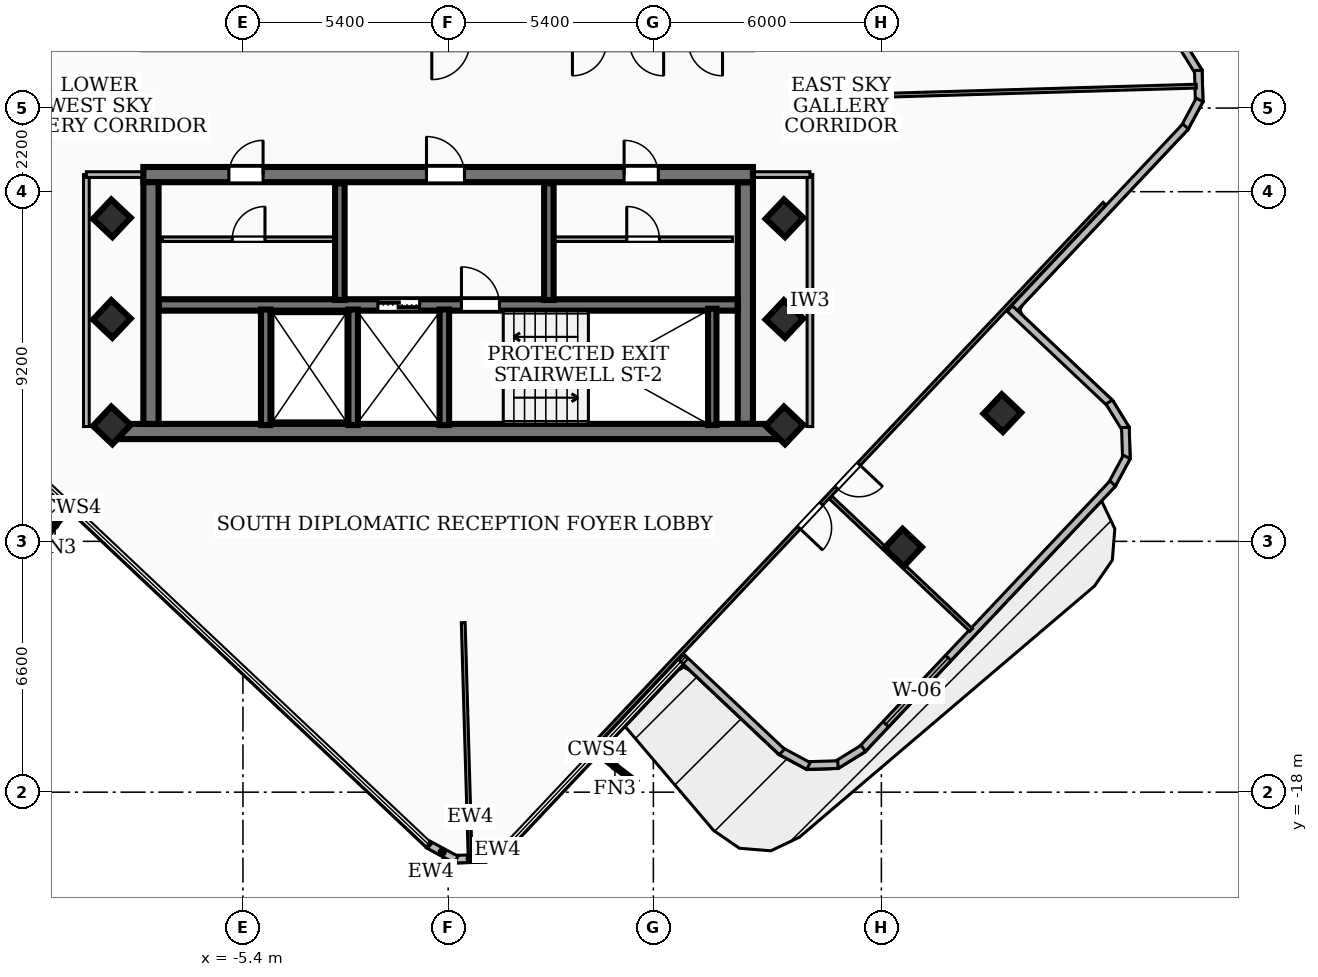
"""IFC4 building model, lengths in metres.
Left out: names, types, materials, properties, quantities, classifications, styles, units other than length and angle.
Written with IfcOpenShell. Run it as: python <this file> out.ifc"""

import sys

from ifc_helpers import new_model, si_unit, direction, frame, frame_2d, origin, origin_2d, place, context, subcontext, project, spatial, rectangle, extrude, element, fill, save


model = new_model("IFC4")
c1 = context("Model", 3, precision=1e-05, world=origin(), true_north=direction((0.0, 1.0)))
c2 = subcontext(c1, "Body", "Model", "MODEL_VIEW")
j1 = project(units=[si_unit("LENGTHUNIT", "METRE"), si_unit("PLANEANGLEUNIT", "RADIAN")], contexts=[c1])
p1 = place(None, origin())
s1 = spatial("IfcSite", under=j1, at=p1, CompositionType="ELEMENT")
p2 = place(p1, origin())
s2 = spatial("IfcBuilding", under=s1, at=p2, CompositionType="ELEMENT")
p3 = place(p2, frame((0.0, 0.0, 244.08)))
s3 = spatial("IfcBuildingStorey", under=s2, at=p3, CompositionType="ELEMENT", Elevation=244.08)
p4 = place(p3, frame((8.78, -8.51, 0.0), z_axis=(0.0, 0.0, 1.0), x_axis=(-1.0, 0.0, 0.0)))
e1 = element("IfcWall", 1, at=p4, inside=s3, PredefinedType="SHEAR", context=c2, shape_type="SweptSolid", body=[
    extrude(rectangle(XDim=17.56, YDim=0.4, at=frame_2d((8.78, 0.0))), origin(), (0.0, 0.0, 1.0), 3.16),
])
p5 = place(p3, frame((-8.02, -1.75, 0.0), z_axis=(0.0, 0.0, 1.0), x_axis=(1.0, 0.0, 0.0)))
e2 = element("IfcWall", 2, at=p5, inside=s3, PredefinedType="SHEAR", context=c2, shape_type="SweptSolid", body=[
    extrude(rectangle(XDim=16.04, YDim=0.4, at=frame_2d((8.02, 0.0))), origin(), (0.0, 0.0, 1.0), 3.16),
])
p6 = place(p5, frame((7.45, 0.0, 0.0)))
e3 = element("IfcOpeningElement", 3, at=p6, cuts=e2, PredefinedType="OPENING", context=c2, shape_type="SweptSolid", body=[
    extrude(rectangle(XDim=1.0, YDim=2.1, at=frame_2d((0.5, 1.05))), frame((0.0, 0.21, 0.0), z_axis=(0.0, -1.0, 0.0), x_axis=(1.0, 0.0, 0.0)), (0.0, 0.0, 1.0), 0.42),
])
p7 = place(p5, frame((12.65, 0.0, 0.0)))
e4 = element("IfcOpeningElement", 4, at=p7, cuts=e2, PredefinedType="OPENING", context=c2, shape_type="SweptSolid", body=[
    extrude(rectangle(XDim=0.9, YDim=2.06, at=frame_2d((0.45, 1.03))), frame((0.0, 0.21, 0.0), z_axis=(0.0, -1.0, 0.0), x_axis=(1.0, 0.0, 0.0)), (0.0, 0.0, 1.0), 0.42),
])
p8 = place(p5, frame((2.25, 0.0, 0.0)))
e5 = element("IfcOpeningElement", 5, at=p8, cuts=e2, PredefinedType="OPENING", context=c2, shape_type="SweptSolid", body=[
    extrude(rectangle(XDim=0.9, YDim=2.06, at=frame_2d((0.45, 1.03))), frame((0.0, 0.21, 0.0), z_axis=(0.0, -1.0, 0.0), x_axis=(1.0, 0.0, 0.0)), (0.0, 0.0, 1.0), 0.42),
])
for number, where, z_axis, x_axis in (
    (6, (-7.82, -8.31, 0.0), (0.0, 0.0, 1.0), (0.0, 1.0, 0.0)),
    (7, (7.82, -1.95, 0.0), (0.0, 0.0, 1.0), (0.0, -1.0, 0.0)),
):
    element("IfcWall", number, at=place(p3, frame(where, z_axis=z_axis, x_axis=x_axis)), inside=s3, PredefinedType="SHEAR", context=c2, shape_type="SweptSolid", body=[
        extrude(rectangle(XDim=6.36, YDim=0.4, at=frame_2d((3.18, 0.0))), origin(), (0.0, 0.0, 1.0), 3.16),
    ])
p9 = place(p3, frame((-7.62, -5.18, 0.0), z_axis=(0.0, 0.0, 1.0), x_axis=(1.0, 0.0, 0.0)))
e8 = element("IfcWall", 8, at=p9, inside=s3, PredefinedType="SOLIDWALL", context=c2, shape_type="SweptSolid", body=[
    extrude(rectangle(XDim=15.24, YDim=0.3, at=frame_2d((7.62, 0.0))), origin(), (0.0, 0.0, 1.0), 3.16),
])
p10 = place(p9, frame((5.77, 0.0, 0.0)))
e9 = element("IfcOpeningElement", 9, at=p10, cuts=e8, PredefinedType="OPENING", context=c2, shape_type="SweptSolid", body=[
    extrude(rectangle(XDim=1.1, YDim=2.15, at=frame_2d((0.55, 1.075))), frame((0.0, 0.16, 0.0), z_axis=(0.0, -1.0, 0.0), x_axis=(1.0, 0.0, 0.0)), (0.0, 0.0, 1.0), 0.32),
])
p11 = place(p9, frame((7.97, 0.0, 0.0)))
e10 = element("IfcOpeningElement", 10, at=p11, cuts=e8, PredefinedType="OPENING", context=c2, shape_type="SweptSolid", body=[
    extrude(rectangle(XDim=1.0, YDim=2.1, at=frame_2d((0.5, 1.05))), frame((0.0, 0.16, 0.0), z_axis=(0.0, -1.0, 0.0), x_axis=(1.0, 0.0, 0.0)), (0.0, 0.0, 1.0), 0.32),
])
p12 = place(p3, frame((6.95, -8.34, 0.0), z_axis=(0.0, 0.0, 1.0), x_axis=(0.0, 1.0, 0.0)))
e11 = element("IfcWall", 11, at=p12, inside=s3, PredefinedType="SOLIDWALL", context=c2, shape_type="SweptSolid", body=[
    extrude(rectangle(XDim=3.06, YDim=0.22, at=frame_2d((1.53, 0.0))), origin(), (0.0, 0.0, 1.0), 3.16),
])
for number, where, z_axis, x_axis in (
    (12, (-0.1, -8.34, 0.0), (0.0, 0.0, 1.0), (0.0, 1.0, 0.0)),
    (13, (-2.5, -8.34, 0.0), (0.0, 0.0, 1.0), (0.0, 1.0, 0.0)),
    (14, (-4.8, -8.34, 0.0), (0.0, 0.0, 1.0), (0.0, 1.0, 0.0)),
):
    element("IfcWall", number, at=place(p3, frame(where, z_axis=z_axis, x_axis=x_axis)), inside=s3, PredefinedType="SOLIDWALL", context=c2, shape_type="SweptSolid", body=[
        extrude(rectangle(XDim=3.04, YDim=0.25, at=frame_2d((1.52, 0.0))), origin(), (0.0, 0.0, 1.0), 3.16),
    ])
for number, where, z_axis, x_axis in (
    (15, (-2.85, -5.05, 0.0), (0.0, 0.0, 1.0), (0.0, 1.0, 0.0)),
    (16, (2.65, -5.05, 0.0), (0.0, 0.0, 1.0), (0.0, 1.0, 0.0)),
):
    element("IfcWall", number, at=place(p3, frame(where, z_axis=z_axis, x_axis=x_axis)), inside=s3, PredefinedType="SOLIDWALL", context=c2, shape_type="SweptSolid", body=[
        extrude(rectangle(XDim=3.07, YDim=0.25, at=frame_2d((1.535, 0.0))), origin(), (0.0, 0.0, 1.0), 3.16),
    ])
for number, where, z_axis, x_axis in (
    (17, (-8.85, -5.55, 0.0), (0.0, 0.0, 1.0), (0.686, 0.728, 0.0)),
    (18, (-8.85, -2.9, 0.0), (0.0, 0.0, 1.0), (0.686, 0.728, 0.0)),
    (19, (8.85, -5.55, 0.0), (0.0, 0.0, 1.0), (0.686, 0.728, 0.0)),
    (20, (8.85, -2.9, 0.0), (0.0, 0.0, 1.0), (0.686, 0.728, 0.0)),
    (21, (8.85, -8.35, 0.0), (0.0, 0.0, 1.0), (0.686, 0.728, 0.0)),
    (22, (-8.85, -8.35, 0.0), (0.0, 0.0, 1.0), (0.686, 0.728, 0.0)),
    (23, (11.971, -11.566, 0.0), (0.0, 0.0, 1.0), (0.686, 0.728, 0.0)),
    (24, (14.583, -8.026, 0.0), (0.0, 0.0, 1.0), (0.686, 0.728, 0.0)),
):
    element("IfcColumn", number, at=place(p3, frame(where, z_axis=z_axis, x_axis=x_axis)), inside=s3, PredefinedType="COLUMN", context=c2, shape_type="SweptSolid", body=[
        extrude(rectangle(XDim=0.7, YDim=0.7, at=origin_2d()), origin(), (0.0, 0.0, 1.0), 3.42),
    ])
p13 = place(p3, frame((1.658, -19.313, 0.0), z_axis=(0.0, 0.0, 1.0), x_axis=(-0.850997215859, -0.52517019965, 0.0)))
e25 = element("IfcWall", 25, at=p13, inside=s3, PredefinedType="SOLIDWALL", context=c2, shape_type="SweptSolid", body=[
    extrude(rectangle(XDim=0.838, YDim=0.2, at=frame_2d((0.419, 0.0))), origin(), (0.0, 0.0, 1.0), 3.16),
])
p14 = place(p3, frame((0.991, -19.739, 0.0), z_axis=(0.0, 0.0, 1.0), x_axis=(-0.999578691641, -0.029024803491, 0.0)))
e26 = element("IfcWall", 26, at=p14, inside=s3, PredefinedType="SOLIDWALL", context=c2, shape_type="SweptSolid", body=[
    extrude(rectangle(XDim=0.824, YDim=0.2, at=frame_2d((0.412, 0.0))), origin(), (0.0, 0.0, 1.0), 3.16),
])
p15 = place(p3, frame((0.214, -19.774, 0.0), z_axis=(0.0, 0.0, 1.0), x_axis=(-0.880199822755, 0.474603278561, 0.0)))
e27 = element("IfcWall", 27, at=p15, inside=s3, PredefinedType="SOLIDWALL", context=c2, shape_type="SweptSolid", body=[
    extrude(rectangle(XDim=0.838, YDim=0.2, at=frame_2d((0.419, 0.0))), origin(), (0.0, 0.0, 1.0), 3.16),
])
p16 = place(p3, frame((19.313, 1.658, 0.0), z_axis=(0.0, 0.0, 1.0), x_axis=(0.52517019965, -0.850997215859, 0.0)))
e28 = element("IfcWall", 28, at=p16, inside=s3, PredefinedType="SOLIDWALL", context=c2, shape_type="SweptSolid", body=[
    extrude(rectangle(XDim=0.838, YDim=0.2, at=frame_2d((0.419, 0.0))), origin(), (0.0, 0.0, 1.0), 3.16),
])
p17 = place(p3, frame((19.739, 0.991, 0.0), z_axis=(0.0, 0.0, 1.0), x_axis=(0.029024803491, -0.999578691641, 0.0)))
e29 = element("IfcWall", 29, at=p17, inside=s3, PredefinedType="SOLIDWALL", context=c2, shape_type="SweptSolid", body=[
    extrude(rectangle(XDim=0.824, YDim=0.2, at=frame_2d((0.412, 0.0))), origin(), (0.0, 0.0, 1.0), 3.16),
])
p18 = place(p3, frame((19.774, 0.214, 0.0), z_axis=(0.0, 0.0, 1.0), x_axis=(-0.474603278561, -0.880199822755, 0.0)))
e30 = element("IfcWall", 30, at=p18, inside=s3, PredefinedType="SOLIDWALL", context=c2, shape_type="SweptSolid", body=[
    extrude(rectangle(XDim=0.838, YDim=0.2, at=frame_2d((0.419, 0.0))), origin(), (0.0, 0.0, 1.0), 3.16),
])
p19 = place(p3, frame((19.405, -0.484, 0.0), z_axis=(0.0, 0.0, 1.0), x_axis=(-0.686028756372, -0.727574426042, 0.0)))
e31 = element("IfcWall", 31, at=p19, inside=s3, PredefinedType="SOLIDWALL", context=c2, shape_type="SweptSolid", body=[
    extrude(rectangle(XDim=6.74, YDim=0.2, at=frame_2d((3.37, 0.0))), origin(), (0.0, 0.0, 1.0), 3.16),
])
p20 = place(p3, frame((14.778, -5.275, 0.0), z_axis=(0.0, 0.0, 1.0), x_axis=(0.727262285553, -0.686359649172, 0.0)))
e32 = element("IfcWall", 32, at=p20, inside=s3, PredefinedType="SOLIDWALL", context=c2, shape_type="SweptSolid", body=[
    extrude(rectangle(XDim=3.641, YDim=0.2, at=frame_2d((1.82, 0.0))), origin(), (0.0, 0.0, 1.0), 3.16),
])
p21 = place(p3, frame((17.395, -7.736, 0.0), z_axis=(0.0, 0.0, 1.0), x_axis=(0.52517019965, -0.850997215859, 0.0)))
e33 = element("IfcWall", 33, at=p21, inside=s3, PredefinedType="SOLIDWALL", context=c2, shape_type="SweptSolid", body=[
    extrude(rectangle(XDim=0.838, YDim=0.2, at=frame_2d((0.419, 0.0))), origin(), (0.0, 0.0, 1.0), 3.16),
])
p22 = place(p3, frame((17.821, -8.403, 0.0), z_axis=(0.0, 0.0, 1.0), x_axis=(0.030208429442, -0.999543621255, 0.0)))
e34 = element("IfcWall", 34, at=p22, inside=s3, PredefinedType="SOLIDWALL", context=c2, shape_type="SweptSolid", body=[
    extrude(rectangle(XDim=0.824, YDim=0.2, at=frame_2d((0.412, 0.0))), origin(), (0.0, 0.0, 1.0), 3.16),
])
p23 = place(p3, frame((17.857, -9.18, 0.0), z_axis=(0.0, 0.0, 1.0), x_axis=(-0.474603278561, -0.880199822755, 0.0)))
e35 = element("IfcWall", 35, at=p23, inside=s3, PredefinedType="SOLIDWALL", context=c2, shape_type="SweptSolid", body=[
    extrude(rectangle(XDim=0.838, YDim=0.2, at=frame_2d((0.419, 0.0))), origin(), (0.0, 0.0, 1.0), 3.16),
])
p24 = place(p3, frame((17.488, -9.878, 0.0), z_axis=(0.0, 0.0, 1.0), x_axis=(-0.686075032126, -0.727530789928, 0.0)))
e36 = element("IfcWall", 36, at=p24, inside=s3, PredefinedType="SOLIDWALL", context=c2, shape_type="SweptSolid", body=[
    extrude(rectangle(XDim=9.623, YDim=0.2, at=frame_2d((4.812, 0.0))), origin(), (0.0, 0.0, 1.0), 3.16),
])
p25 = place(p24, frame((6.306, 0.0, 0.85)))
e37 = element("IfcOpeningElement", 37, at=p25, cuts=e36, PredefinedType="OPENING", context=c2, shape_type="SweptSolid", body=[
    extrude(rectangle(XDim=2.4, YDim=1.85, at=frame_2d((1.2, 0.925))), frame((0.0, 0.11, 0.0), z_axis=(0.0, -1.0, 0.0), x_axis=(1.0, 0.0, 0.0)), (0.0, 0.0, 1.0), 0.22),
])
p26 = place(p3, frame((10.924, -16.848, 0.0), z_axis=(0.0, 0.0, 1.0), x_axis=(-0.850947362812, -0.525250974033, 0.0)))
e38 = element("IfcWall", 38, at=p26, inside=s3, PredefinedType="SOLIDWALL", context=c2, shape_type="SweptSolid", body=[
    extrude(rectangle(XDim=0.838, YDim=0.2, at=frame_2d((0.419, 0.0))), origin(), (0.0, 0.0, 1.0), 3.16),
])
p27 = place(p3, frame((10.257, -17.274, 0.0), z_axis=(0.0, 0.0, 1.0), x_axis=(-0.999534635062, -0.03050431627, 0.0)))
e39 = element("IfcWall", 39, at=p27, inside=s3, PredefinedType="SOLIDWALL", context=c2, shape_type="SweptSolid", body=[
    extrude(rectangle(XDim=0.824, YDim=0.2, at=frame_2d((0.412, 0.0))), origin(), (0.0, 0.0, 1.0), 3.16),
])
p28 = place(p3, frame((9.48, -17.31, 0.0), z_axis=(0.0, 0.0, 1.0), x_axis=(-0.880199822755, 0.474603278561, 0.0)))
e40 = element("IfcWall", 40, at=p28, inside=s3, PredefinedType="SOLIDWALL", context=c2, shape_type="SweptSolid", body=[
    extrude(rectangle(XDim=0.838, YDim=0.2, at=frame_2d((0.419, 0.0))), origin(), (0.0, 0.0, 1.0), 3.16),
])
p29 = place(p3, frame((8.782, -16.941, 0.0), z_axis=(0.0, 0.0, 1.0), x_axis=(-0.727388601412, 0.686225781019, 0.0)))
e41 = element("IfcWall", 41, at=p29, inside=s3, PredefinedType="SOLIDWALL", context=c2, shape_type="SweptSolid", body=[
    extrude(rectangle(XDim=3.642, YDim=0.2, at=frame_2d((1.821, 0.0))), origin(), (0.0, 0.0, 1.0), 3.16),
])
p30 = place(p3, frame((2.8, -3.45, 0.0), z_axis=(0.0, 0.0, 1.0), x_axis=(1.0, 0.0, 0.0)))
e42 = element("IfcWall", 42, at=p30, inside=s3, PredefinedType="PARTITIONING", context=c2, shape_type="SweptSolid", body=[
    extrude(rectangle(XDim=4.68, YDim=0.12, at=frame_2d((2.34, 0.0))), origin(), (0.0, 0.0, 1.0), 3.16),
])
p31 = place(p30, frame((1.9, 0.0, 0.0)))
e43 = element("IfcOpeningElement", 43, at=p31, cuts=e42, PredefinedType="OPENING", context=c2, shape_type="SweptSolid", body=[
    extrude(rectangle(XDim=0.86, YDim=2.04, at=frame_2d((0.43, 1.02))), frame((0.0, 0.07, 0.0), z_axis=(0.0, -1.0, 0.0), x_axis=(1.0, 0.0, 0.0)), (0.0, 0.0, 1.0), 0.14),
])
p32 = place(p3, frame((-7.52, -3.45, 0.0), z_axis=(0.0, 0.0, 1.0), x_axis=(1.0, 0.0, 0.0)))
e44 = element("IfcWall", 44, at=p32, inside=s3, PredefinedType="PARTITIONING", context=c2, shape_type="SweptSolid", body=[
    extrude(rectangle(XDim=4.54, YDim=0.12, at=frame_2d((2.27, 0.0))), origin(), (0.0, 0.0, 1.0), 3.16),
])
p33 = place(p32, frame((1.84, 0.0, 0.0)))
e45 = element("IfcOpeningElement", 45, at=p33, cuts=e44, PredefinedType="OPENING", context=c2, shape_type="SweptSolid", body=[
    extrude(rectangle(XDim=0.86, YDim=2.04, at=frame_2d((0.43, 1.02))), frame((0.0, 0.07, 0.0), z_axis=(0.0, -1.0, 0.0), x_axis=(1.0, 0.0, 0.0)), (0.0, 0.0, 1.0), 0.14),
])
p34 = place(p3, frame((-9.52, -8.38, 0.0), z_axis=(0.0, 0.0, 1.0), x_axis=(0.0, 1.0, 0.0)))
e46 = element("IfcWall", 46, at=p34, inside=s3, PredefinedType="PARTITIONING", context=c2, shape_type="SweptSolid", body=[
    extrude(rectangle(XDim=6.63, YDim=0.15, at=frame_2d((3.315, 0.0))), origin(), (0.0, 0.0, 1.0), 3.16),
])
p35 = place(p3, frame((-7.85, -1.75, 0.0), z_axis=(0.0, 0.0, 1.0), x_axis=(-1.0, 0.0, 0.0)))
e47 = element("IfcWall", 47, at=p35, inside=s3, PredefinedType="PARTITIONING", context=c2, shape_type="SweptSolid", body=[
    extrude(rectangle(XDim=1.67, YDim=0.15, at=frame_2d((0.835, 0.0))), origin(), (0.0, 0.0, 1.0), 2.39),
])
p36 = place(p3, frame((9.52, -8.38, 0.0), z_axis=(0.0, 0.0, 1.0), x_axis=(0.0, 1.0, 0.0)))
e48 = element("IfcWall", 48, at=p36, inside=s3, PredefinedType="PARTITIONING", context=c2, shape_type="SweptSolid", body=[
    extrude(rectangle(XDim=6.63, YDim=0.15, at=frame_2d((3.315, 0.0))), origin(), (0.0, 0.0, 1.0), 2.53),
])
p37 = place(p3, frame((7.85, -1.75, 0.0), z_axis=(0.0, 0.0, 1.0), x_axis=(1.0, 0.0, 0.0)))
e49 = element("IfcWall", 49, at=p37, inside=s3, PredefinedType="PARTITIONING", context=c2, shape_type="SweptSolid", body=[
    extrude(rectangle(XDim=1.67, YDim=0.15, at=frame_2d((0.835, 0.0))), origin(), (0.0, 0.0, 1.0), 2.39),
])
p38 = place(p3, frame((0.397, -13.54, 0.0), z_axis=(0.0, 0.0, 1.0), x_axis=(0.029263699144, -0.999571726247, 0.0)))
e50 = element("IfcWall", 50, at=p38, inside=s3, PredefinedType="PARTITIONING", context=c2, shape_type="SweptSolid", body=[
    extrude(rectangle(XDim=6.149, YDim=0.1, at=frame_2d((3.074, 0.0))), origin(), (0.0, 0.0, 1.0), 3.16),
])
p39 = place(p3, frame((11.395, 0.334, 0.0), z_axis=(0.0, 0.0, 1.0), x_axis=(0.999571055306, 0.029286607775, 0.0)))
e51 = element("IfcWall", 51, at=p39, inside=s3, PredefinedType="PARTITIONING", context=c2, shape_type="SweptSolid", body=[
    extrude(rectangle(XDim=8.295, YDim=0.1, at=frame_2d((4.147, 0.0))), origin(), (0.0, 0.0, 1.0), 3.16),
])
p40 = place(p3, frame((10.063, -10.245, 0.0), z_axis=(0.0, 0.0, 1.0), x_axis=(0.727475044052, -0.686134141608, 0.0)))
e52 = element("IfcWall", 52, at=p40, inside=s3, PredefinedType="PARTITIONING", context=c2, shape_type="SweptSolid", body=[
    extrude(rectangle(XDim=5.085, YDim=0.1, at=frame_2d((2.542, 0.0))), origin(), (0.0, 0.0, 1.0), 3.16),
])
p41 = place(p3, frame((17.271, -2.514, 0.0), z_axis=(0.0, 0.0, 1.0), x_axis=(-0.686068145865, -0.727537283739, 0.0)))
e53 = element("IfcWall", 53, at=p41, inside=s3, PredefinedType="PARTITIONING", context=c2, shape_type="SweptSolid", body=[
    extrude(rectangle(XDim=20.04, YDim=0.1, at=frame_2d((10.02, 0.0))), origin(), (0.0, 0.0, 1.0), 2.53),
])
p42 = place(p41, frame((10.86, 0.0, 0.0)))
e54 = element("IfcOpeningElement", 54, at=p42, cuts=e53, PredefinedType="OPENING", context=c2, shape_type="SweptSolid", body=[
    extrude(rectangle(XDim=0.86, YDim=2.04, at=frame_2d((0.43, 1.02))), frame((0.0, 0.06, 0.0), z_axis=(0.0, -1.0, 0.0), x_axis=(1.0, 0.0, 0.0)), (0.0, 0.0, 1.0), 0.12),
])
p43 = place(p41, frame((9.42, 0.0, 0.0)))
e55 = element("IfcOpeningElement", 55, at=p43, cuts=e53, PredefinedType="OPENING", context=c2, shape_type="SweptSolid", body=[
    extrude(rectangle(XDim=0.86, YDim=2.04, at=frame_2d((0.43, 1.02))), frame((0.0, 0.06, 0.0), z_axis=(0.0, -1.0, 0.0), x_axis=(1.0, 0.0, 0.0)), (0.0, 0.0, 1.0), 0.12),
])
p44 = place(p25, origin())
e56 = element("IfcWindow", 56, at=p44, inside=s3, PartitioningType="SINGLE_PANEL", PredefinedType="WINDOW", context=c2, shape_type="SweptSolid", body=[
    extrude(rectangle(XDim=2.4, YDim=1.85, at=frame_2d((1.2, 0.925))), frame((0.0, 0.03, 0.0), z_axis=(0.0, -1.0, 0.0), x_axis=(1.0, 0.0, 0.0)), (0.0, 0.0, 1.0), 0.06),
])
fill(e37, e56)
p45 = place(p6, origin())
e57 = element("IfcDoor", 57, at=p45, inside=s3, OperationType="SINGLE_SWING_LEFT", PredefinedType="DOOR", context=c2, shape_type="SweptSolid", body=[
    extrude(rectangle(XDim=1.0, YDim=2.1, at=frame_2d((0.5, 1.05))), frame((0.0, 0.025, 0.0), z_axis=(0.0, -1.0, 0.0), x_axis=(1.0, 0.0, 0.0)), (0.0, 0.0, 1.0), 0.05),
])
fill(e3, e57)
p46 = place(p10, origin())
e58 = element("IfcDoor", 58, at=p46, inside=s3, OperationType="DOUBLE_DOOR_SLIDING", PredefinedType="DOOR", context=c2, shape_type="SweptSolid", body=[
    extrude(rectangle(XDim=1.1, YDim=2.15, at=frame_2d((0.55, 1.075))), frame((0.0, 0.025, 0.0), z_axis=(0.0, -1.0, 0.0), x_axis=(1.0, 0.0, 0.0)), (0.0, 0.0, 1.0), 0.05),
])
fill(e9, e58)
p47 = place(p11, origin())
e59 = element("IfcDoor", 59, at=p47, inside=s3, OperationType="SINGLE_SWING_LEFT", PredefinedType="DOOR", context=c2, shape_type="SweptSolid", body=[
    extrude(rectangle(XDim=1.0, YDim=2.1, at=frame_2d((0.5, 1.05))), frame((0.0, 0.025, 0.0), z_axis=(0.0, -1.0, 0.0), x_axis=(1.0, 0.0, 0.0)), (0.0, 0.0, 1.0), 0.05),
])
fill(e10, e59)
p48 = place(p7, origin())
e60 = element("IfcDoor", 60, at=p48, inside=s3, OperationType="SINGLE_SWING_LEFT", PredefinedType="DOOR", context=c2, shape_type="SweptSolid", body=[
    extrude(rectangle(XDim=0.9, YDim=2.06, at=frame_2d((0.45, 1.03))), frame((0.0, 0.025, 0.0), z_axis=(0.0, -1.0, 0.0), x_axis=(1.0, 0.0, 0.0)), (0.0, 0.0, 1.0), 0.05),
])
fill(e4, e60)
p49 = place(p8, origin())
e61 = element("IfcDoor", 61, at=p49, inside=s3, OperationType="SINGLE_SWING_RIGHT", PredefinedType="DOOR", context=c2, shape_type="SweptSolid", body=[
    extrude(rectangle(XDim=0.9, YDim=2.06, at=frame_2d((0.45, 1.03))), frame((0.0, 0.025, 0.0), z_axis=(0.0, -1.0, 0.0), x_axis=(1.0, 0.0, 0.0)), (0.0, 0.0, 1.0), 0.05),
])
fill(e5, e61)
p50 = place(p31, origin())
e62 = element("IfcDoor", 62, at=p50, inside=s3, OperationType="SINGLE_SWING_LEFT", PredefinedType="DOOR", context=c2, shape_type="SweptSolid", body=[
    extrude(rectangle(XDim=0.86, YDim=2.04, at=frame_2d((0.43, 1.02))), frame((0.0, 0.025, 0.0), z_axis=(0.0, -1.0, 0.0), x_axis=(1.0, 0.0, 0.0)), (0.0, 0.0, 1.0), 0.05),
])
fill(e43, e62)
p51 = place(p33, origin())
e63 = element("IfcDoor", 63, at=p51, inside=s3, OperationType="SINGLE_SWING_RIGHT", PredefinedType="DOOR", context=c2, shape_type="SweptSolid", body=[
    extrude(rectangle(XDim=0.86, YDim=2.04, at=frame_2d((0.43, 1.02))), frame((0.0, 0.025, 0.0), z_axis=(0.0, -1.0, 0.0), x_axis=(1.0, 0.0, 0.0)), (0.0, 0.0, 1.0), 0.05),
])
fill(e45, e63)
p52 = place(p42, origin())
e64 = element("IfcDoor", 64, at=p52, inside=s3, OperationType="SINGLE_SWING_RIGHT", PredefinedType="DOOR", context=c2, shape_type="SweptSolid", body=[
    extrude(rectangle(XDim=0.86, YDim=2.04, at=frame_2d((0.43, 1.02))), frame((0.0, 0.025, 0.0), z_axis=(0.0, -1.0, 0.0), x_axis=(1.0, 0.0, 0.0)), (0.0, 0.0, 1.0), 0.05),
])
fill(e54, e64)
p53 = place(p43, origin())
e65 = element("IfcDoor", 65, at=p53, inside=s3, OperationType="SINGLE_SWING_LEFT", PredefinedType="DOOR", context=c2, shape_type="SweptSolid", body=[
    extrude(rectangle(XDim=0.86, YDim=2.04, at=frame_2d((0.43, 1.02))), frame((0.0, 0.025, 0.0), z_axis=(0.0, -1.0, 0.0), x_axis=(1.0, 0.0, 0.0)), (0.0, 0.0, 1.0), 0.05),
])
fill(e55, e65)
save(model, sys.argv[1])
